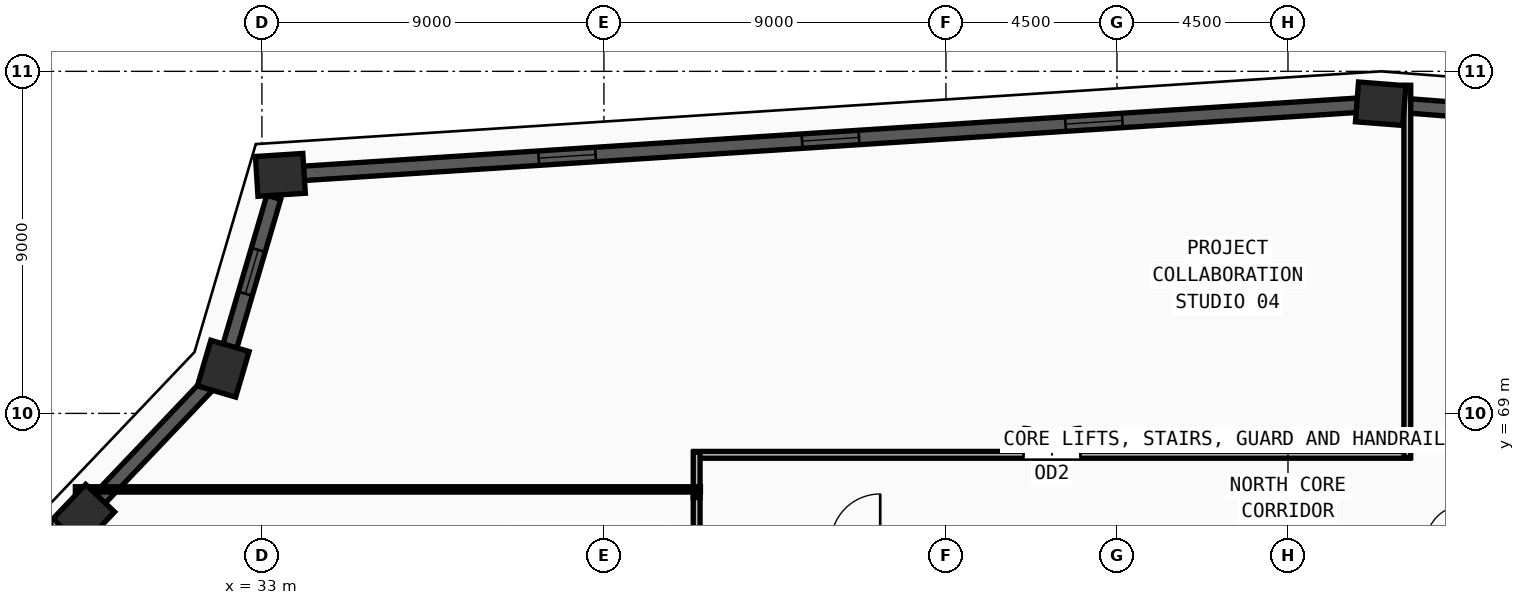
"""IFC4 building model, lengths in metres.
Left out: names, types, materials, properties, quantities, classifications, styles, units other than length and angle.
Written with IfcOpenShell. Run it as: python <this file> out.ifc"""

import sys

from ifc_helpers import new_model, si_unit, direction, frame, frame_2d, origin, origin_2d, place, context, subcontext, project, spatial, rectangle, extrude, source, transform, mapped, element, fill, save


model = new_model("IFC4")
c1 = context("Model", 3, precision=1e-05, world=origin(), true_north=direction((0.0, 1.0)))
c2 = subcontext(c1, "Body", "Model", "MODEL_VIEW")
j1 = project(units=[si_unit("LENGTHUNIT", "METRE"), si_unit("PLANEANGLEUNIT", "RADIAN")], contexts=[c1])
p1 = place(None, origin())
s1 = spatial("IfcSite", under=j1, at=p1, CompositionType="ELEMENT")
p2 = place(p1, origin())
s2 = spatial("IfcBuilding", under=s1, at=p2, CompositionType="ELEMENT")
p3 = place(p2, frame((0.0, 0.0, 258.75)))
s3 = spatial("IfcBuildingStorey", under=s2, at=p3, CompositionType="ELEMENT", Elevation=258.75)
m1 = source(origin(), c2, "Body", "SweptSolid", [
    extrude(rectangle(XDim=1.25, YDim=1.05, at=origin_2d()), origin(), (0.0, 0.0, 1.0), 3.75),
])
for number, where, z_axis, x_axis in (
    (1, (28.312, 66.317, 0.0), (0.0, 0.0, 1.0), (0.689, 0.724, 0.0)),
    (2, (31.983, 70.176, 0.0), (0.0, 0.0, 1.0), (0.283, 0.959, 0.0)),
    (3, (33.486, 75.276, 0.0), (0.0, 0.0, 1.0), (0.998, 0.065, 0.0)),
    (4, (62.439, 77.148, 0.0), (0.0, 0.0, 1.0), (-0.997, 0.077, 0.0)),
):
    element("IfcColumn", number, at=place(p3, frame(where, z_axis=z_axis, x_axis=x_axis)), inside=s3, PredefinedType="COLUMN", context=c2, shape_type="MappedRepresentation", body=[
        mapped(m1, transform((0.0, 0.0, 0.0), x_axis=(1.0, 0.0, 0.0), y_axis=(0.0, 1.0, 0.0), z_axis=(0.0, 0.0, 1.0), scale=1.0)),
    ])
p4 = place(p3, frame((85.898, 75.331, 0.0), z_axis=(0.0, 0.0, 1.0), x_axis=(-0.997012155609, 0.077244815801, 0.0)))
e5 = element("IfcWall", 5, at=p4, inside=s3, PredefinedType="SOLIDWALL", context=c2, shape_type="SweptSolid", body=[
    extrude(rectangle(XDim=22.914, YDim=0.38, at=frame_2d((11.457, 0.0))), origin(), (0.0, 0.0, 1.0), 3.57),
])
m2 = source(origin(), c2, "Body", "SweptSolid", [
    extrude(rectangle(XDim=1.5, YDim=1.9, at=frame_2d((0.75, 0.95))), frame((0.0, 0.2, 0.0), z_axis=(0.0, -1.0, 0.0), x_axis=(1.0, 0.0, 0.0)), (0.0, 0.0, 1.0), 0.4),
])
p5 = place(p4, frame((4.979, 0.0, 0.55)))
e6 = element("IfcOpeningElement", 6, at=p5, cuts=e5, PredefinedType="OPENING", context=c2, shape_type="MappedRepresentation", body=[
    mapped(m2, transform((0.0, 0.0, 0.0), x_axis=(1.0, 0.0, 0.0), y_axis=(0.0, 1.0, 0.0), z_axis=(0.0, 0.0, 1.0), scale=1.0)),
])
p6 = place(p4, frame((10.707, 0.0, 0.55)))
e7 = element("IfcOpeningElement", 7, at=p6, cuts=e5, PredefinedType="OPENING", context=c2, shape_type="MappedRepresentation", body=[
    mapped(m2, transform((0.0, 0.0, 0.0), x_axis=(1.0, 0.0, 0.0), y_axis=(0.0, 1.0, 0.0), z_axis=(0.0, 0.0, 1.0), scale=1.0)),
])
p7 = place(p4, frame((16.436, 0.0, 0.55)))
e8 = element("IfcOpeningElement", 8, at=p7, cuts=e5, PredefinedType="OPENING", context=c2, shape_type="MappedRepresentation", body=[
    mapped(m2, transform((0.0, 0.0, 0.0), x_axis=(1.0, 0.0, 0.0), y_axis=(0.0, 1.0, 0.0), z_axis=(0.0, 0.0, 1.0), scale=1.0)),
])
p8 = place(p3, frame((61.825, 77.108, 0.0), z_axis=(0.0, 0.0, 1.0), x_axis=(-0.997917689191, -0.064500275963, 0.0)))
e9 = element("IfcWall", 9, at=p8, inside=s3, PredefinedType="SOLIDWALL", context=c2, shape_type="SweptSolid", body=[
    extrude(rectangle(XDim=27.783, YDim=0.38, at=frame_2d((13.891, 0.0))), origin(), (0.0, 0.0, 1.0), 3.57),
])
p9 = place(p8, frame((6.196, 0.0, 0.55)))
e10 = element("IfcOpeningElement", 10, at=p9, cuts=e9, PredefinedType="OPENING", context=c2, shape_type="MappedRepresentation", body=[
    mapped(m2, transform((0.0, 0.0, 0.0), x_axis=(1.0, 0.0, 0.0), y_axis=(0.0, 1.0, 0.0), z_axis=(0.0, 0.0, 1.0), scale=1.0)),
])
p10 = place(p8, frame((13.141, 0.0, 0.55)))
e11 = element("IfcOpeningElement", 11, at=p10, cuts=e9, PredefinedType="OPENING", context=c2, shape_type="MappedRepresentation", body=[
    mapped(m2, transform((0.0, 0.0, 0.0), x_axis=(1.0, 0.0, 0.0), y_axis=(0.0, 1.0, 0.0), z_axis=(0.0, 0.0, 1.0), scale=1.0)),
])
p11 = place(p8, frame((20.087, 0.0, 0.55)))
e12 = element("IfcOpeningElement", 12, at=p11, cuts=e9, PredefinedType="OPENING", context=c2, shape_type="MappedRepresentation", body=[
    mapped(m2, transform((0.0, 0.0, 0.0), x_axis=(1.0, 0.0, 0.0), y_axis=(0.0, 1.0, 0.0), z_axis=(0.0, 0.0, 1.0), scale=1.0)),
])
p12 = place(p3, frame((33.312, 74.686, 0.0), z_axis=(0.0, 0.0, 1.0), x_axis=(-0.282641755903, -0.959225540642, 0.0)))
e13 = element("IfcWall", 13, at=p12, inside=s3, PredefinedType="SOLIDWALL", context=c2, shape_type="SweptSolid", body=[
    extrude(rectangle(XDim=4.087, YDim=0.38, at=frame_2d((2.043, 0.0))), origin(), (0.0, 0.0, 1.0), 3.57),
])
m3 = source(origin(), c2, "Body", "SweptSolid", [
    extrude(rectangle(XDim=1.2, YDim=1.9, at=frame_2d((0.6, 0.95))), frame((0.0, 0.2, 0.0), z_axis=(0.0, -1.0, 0.0), x_axis=(1.0, 0.0, 0.0)), (0.0, 0.0, 1.0), 0.4),
])
p13 = place(p12, frame((1.443, 0.0, 0.55)))
e14 = element("IfcOpeningElement", 14, at=p13, cuts=e13, PredefinedType="OPENING", context=c2, shape_type="MappedRepresentation", body=[
    mapped(m3, transform((0.0, 0.0, 0.0), x_axis=(1.0, 0.0, 0.0), y_axis=(0.0, 1.0, 0.0), z_axis=(0.0, 0.0, 1.0), scale=1.0)),
])
p14 = place(p3, frame((31.559, 69.73, 0.0), z_axis=(0.0, 0.0, 1.0), x_axis=(-0.689302304971, -0.724473831385, 0.0)))
e15 = element("IfcWall", 15, at=p14, inside=s3, PredefinedType="SOLIDWALL", context=c2, shape_type="SweptSolid", body=[
    extrude(rectangle(XDim=4.095, YDim=0.38, at=frame_2d((2.048, 0.0))), origin(), (0.0, 0.0, 1.0), 3.57),
])
p15 = place(p3, frame((44.37, 67.91, 0.0), z_axis=(0.0, 0.0, 1.0), x_axis=(1.0, 0.0, 0.0)))
e16 = element("IfcWall", 16, at=p15, inside=s3, PredefinedType="PARTITIONING", context=c2, shape_type="SweptSolid", body=[
    extrude(rectangle(XDim=18.84, YDim=0.18, at=frame_2d((9.42, 0.0))), origin(), (0.0, 0.0, 1.0), 3.205),
])
m4 = source(origin(), c2, "Body", "SweptSolid", [
    extrude(rectangle(XDim=1.5, YDim=2.2, at=frame_2d((0.75, 1.1))), frame((0.0, 0.1, 0.0), z_axis=(0.0, -1.0, 0.0), x_axis=(1.0, 0.0, 0.0)), (0.0, 0.0, 1.0), 0.2),
])
p16 = place(p15, frame((8.67, 0.0, 0.0)))
e17 = element("IfcOpeningElement", 17, at=p16, cuts=e16, PredefinedType="OPENING", context=c2, shape_type="MappedRepresentation", body=[
    mapped(m4, transform((0.0, 0.0, 0.0), x_axis=(1.0, 0.0, 0.0), y_axis=(0.0, 1.0, 0.0), z_axis=(0.0, 0.0, 1.0), scale=1.0)),
])
p17 = place(p3, frame((63.14, 67.84, 0.0), z_axis=(0.0, 0.0, 1.0), x_axis=(0.0, 1.0, 0.0)))
e18 = element("IfcWall", 18, at=p17, inside=s3, PredefinedType="PARTITIONING", context=c2, shape_type="SweptSolid", body=[
    extrude(rectangle(XDim=9.795, YDim=0.18, at=frame_2d((4.897, 0.0))), origin(), (0.0, 0.0, 1.0), 3.57),
])
p18 = place(p3, frame((44.44, 66.785, 0.0), z_axis=(0.0, 0.0, 1.0), x_axis=(0.0, 1.0, 0.0)))
e19 = element("IfcWall", 19, at=p18, inside=s3, PredefinedType="PARTITIONING", context=c2, shape_type="SweptSolid", body=[
    extrude(rectangle(XDim=1.195, YDim=0.18, at=frame_2d((0.598, 0.0))), origin(), (0.0, 0.0, 1.0), 3.57),
])
p19 = place(p3, frame((44.44, 64.98, 0.0), z_axis=(0.0, 0.0, 1.0), x_axis=(0.0, 1.0, 0.0)))
e20 = element("IfcWall", 20, at=p19, inside=s3, PredefinedType="PARTITIONING", context=c2, shape_type="SweptSolid", body=[
    extrude(rectangle(XDim=1.805, YDim=0.18, at=frame_2d((0.902, 0.0))), origin(), (0.0, 0.0, 1.0), 3.57),
])
p20 = place(p3, frame((44.54, 67.0, 0.0), z_axis=(0.0, 0.0, 1.0), x_axis=(-1.0, 0.0, 0.0)))
e21 = element("IfcWall", 21, at=p20, inside=s3, PredefinedType="PARTITIONING", context=c2, shape_type="SweptSolid", body=[
    extrude(rectangle(XDim=16.449, YDim=0.14, at=frame_2d((8.225, 0.0))), origin(), (0.0, 0.0, 1.0), 3.57),
])
m5 = source(origin(), c2, "Body", "SweptSolid", [
    extrude(rectangle(XDim=1.5, YDim=1.9, at=frame_2d((0.75, 0.95))), frame((0.0, 0.03, 0.0), z_axis=(0.0, -1.0, 0.0), x_axis=(1.0, 0.0, 0.0)), (0.0, 0.0, 1.0), 0.06),
])
p21 = place(p9, origin())
e22 = element("IfcWindow", 22, at=p21, inside=s3, PartitioningType="DOUBLE_PANEL_VERTICAL", PredefinedType="WINDOW", context=c2, shape_type="MappedRepresentation", body=[
    mapped(m5, transform((0.0, 0.0, 0.0), x_axis=(1.0, 0.0, 0.0), y_axis=(0.0, 1.0, 0.0), z_axis=(0.0, 0.0, 1.0), scale=1.0)),
])
fill(e10, e22)
p22 = place(p10, origin())
e23 = element("IfcWindow", 23, at=p22, inside=s3, PartitioningType="DOUBLE_PANEL_VERTICAL", PredefinedType="WINDOW", context=c2, shape_type="MappedRepresentation", body=[
    mapped(m5, transform((0.0, 0.0, 0.0), x_axis=(1.0, 0.0, 0.0), y_axis=(0.0, 1.0, 0.0), z_axis=(0.0, 0.0, 1.0), scale=1.0)),
])
fill(e11, e23)
p23 = place(p11, origin())
e24 = element("IfcWindow", 24, at=p23, inside=s3, PartitioningType="DOUBLE_PANEL_VERTICAL", PredefinedType="WINDOW", context=c2, shape_type="MappedRepresentation", body=[
    mapped(m5, transform((0.0, 0.0, 0.0), x_axis=(1.0, 0.0, 0.0), y_axis=(0.0, 1.0, 0.0), z_axis=(0.0, 0.0, 1.0), scale=1.0)),
])
fill(e12, e24)
m6 = source(origin(), c2, "Body", "SweptSolid", [
    extrude(rectangle(XDim=1.2, YDim=1.9, at=frame_2d((0.6, 0.95))), frame((0.0, 0.03, 0.0), z_axis=(0.0, -1.0, 0.0), x_axis=(1.0, 0.0, 0.0)), (0.0, 0.0, 1.0), 0.06),
])
p24 = place(p13, origin())
e25 = element("IfcWindow", 25, at=p24, inside=s3, PartitioningType="SINGLE_PANEL", PredefinedType="WINDOW", context=c2, shape_type="MappedRepresentation", body=[
    mapped(m6, transform((0.0, 0.0, 0.0), x_axis=(1.0, 0.0, 0.0), y_axis=(0.0, 1.0, 0.0), z_axis=(0.0, 0.0, 1.0), scale=1.0)),
])
fill(e14, e25)
m7 = source(origin(), c2, "Body", "SweptSolid", [
    extrude(rectangle(XDim=1.5, YDim=2.2, at=frame_2d((0.75, 1.1))), frame((0.0, 0.025, 0.0), z_axis=(0.0, -1.0, 0.0), x_axis=(1.0, 0.0, 0.0)), (0.0, 0.0, 1.0), 0.05),
])
p25 = place(p16, origin())
e26 = element("IfcDoor", 26, at=p25, inside=s3, OperationType="DOUBLE_DOOR_SINGLE_SWING", PredefinedType="DOOR", context=c2, shape_type="MappedRepresentation", body=[
    mapped(m7, transform((0.0, 0.0, 0.0), x_axis=(1.0, 0.0, 0.0), y_axis=(0.0, 1.0, 0.0), z_axis=(0.0, 0.0, 1.0), scale=1.0)),
])
fill(e17, e26)
save(model, sys.argv[1])
